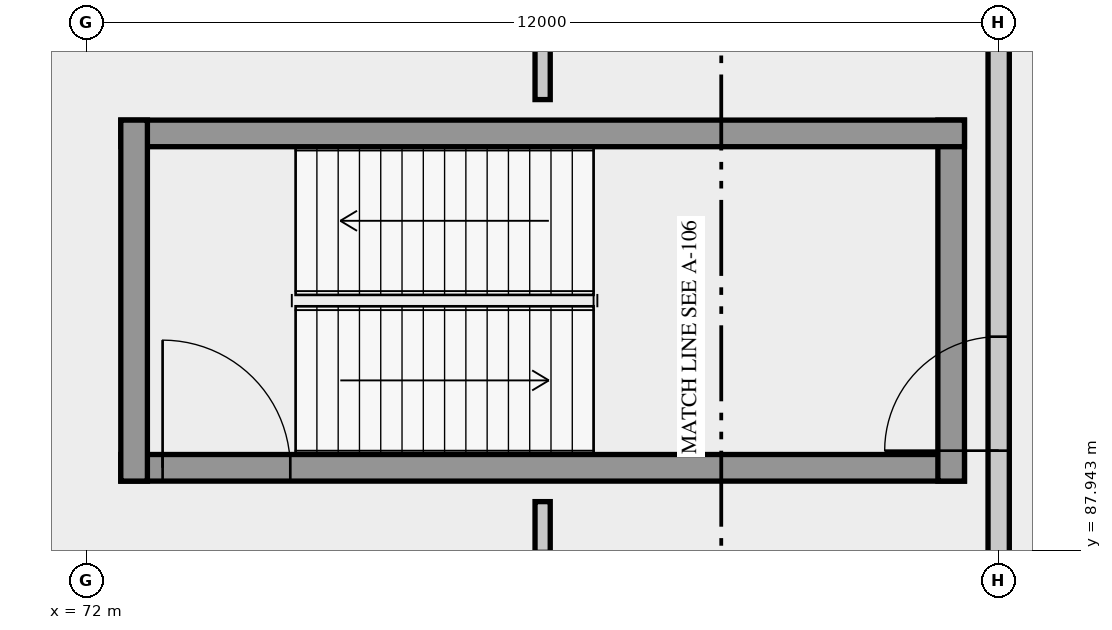
"""IFC4 building model, lengths in metres.
Left out: names, types, materials, properties, quantities, classifications, styles, units other than length and angle.
Written with IfcOpenShell. Run it as: python <this file> out.ifc"""

import sys

from ifc_helpers import new_model, si_unit, direction, frame, frame_2d, origin, place, context, subcontext, project, spatial, rectangle, extrude, element, fill, save


model = new_model("IFC4")
c1 = context("Model", 3, precision=1e-05, world=origin(), true_north=direction((0.0, 1.0)))
c2 = subcontext(c1, "Body", "Model", "MODEL_VIEW")
j1 = project(units=[si_unit("LENGTHUNIT", "METRE"), si_unit("PLANEANGLEUNIT", "RADIAN")], contexts=[c1])
p1 = place(None, origin())
s1 = spatial("IfcSite", under=j1, at=p1, CompositionType="ELEMENT")
p2 = place(p1, origin())
s2 = spatial("IfcBuilding", under=s1, at=p2, CompositionType="ELEMENT")
p3 = place(p2, frame((0.0, 0.0, -5.4)))
s3 = spatial("IfcBuildingStorey", under=s2, at=p3, CompositionType="ELEMENT", Elevation=-5.4)
p4 = place(p3, frame((72.45, 89.025, 0.0), z_axis=(0.0, 0.0, 1.0), x_axis=(1.0, 0.0, 0.0)))
e1 = element("IfcWall", 1, at=p4, inside=s3, PredefinedType="SHEAR", context=c2, shape_type="SweptSolid", body=[
    extrude(rectangle(XDim=11.1, YDim=0.35, at=frame_2d((5.55, 0.0))), origin(), (0.0, 0.0, 1.0), 5.12),
])
p5 = place(p4, frame((0.55, 0.0, 0.0)))
e2 = element("IfcOpeningElement", 2, at=p5, cuts=e1, PredefinedType="OPENING", context=c2, shape_type="SweptSolid", body=[
    extrude(rectangle(XDim=1.68, YDim=2.35, at=frame_2d((0.84, 1.175))), frame((0.0, 0.185, 0.0), z_axis=(0.0, -1.0, 0.0), x_axis=(1.0, 0.0, 0.0)), (0.0, 0.0, 1.0), 0.37),
])
p6 = place(p3, frame((83.375, 88.85, 0.0), z_axis=(0.0, 0.0, 1.0), x_axis=(0.0, 1.0, 0.0)))
e3 = element("IfcWall", 3, at=p6, inside=s3, PredefinedType="SHEAR", context=c2, shape_type="SweptSolid", body=[
    extrude(rectangle(XDim=4.75, YDim=0.35, at=frame_2d((2.375, 0.0))), origin(), (0.0, 0.0, 1.0), 5.12),
])
p7 = place(p3, frame((83.55, 93.425, 0.0), z_axis=(0.0, 0.0, 1.0), x_axis=(-1.0, 0.0, 0.0)))
e4 = element("IfcWall", 4, at=p7, inside=s3, PredefinedType="SHEAR", context=c2, shape_type="SweptSolid", body=[
    extrude(rectangle(XDim=11.1, YDim=0.35, at=frame_2d((5.55, 0.0))), origin(), (0.0, 0.0, 1.0), 5.12),
])
p8 = place(p3, frame((72.625, 93.6, 0.0), z_axis=(0.0, 0.0, 1.0), x_axis=(0.0, -1.0, 0.0)))
e5 = element("IfcWall", 5, at=p8, inside=s3, PredefinedType="SHEAR", context=c2, shape_type="SweptSolid", body=[
    extrude(rectangle(XDim=4.75, YDim=0.35, at=frame_2d((2.375, 0.0))), origin(), (0.0, 0.0, 1.0), 5.12),
])
p9 = place(p3, frame((78.0, 84.37, 0.0), z_axis=(0.0, 0.0, 1.0), x_axis=(0.0, 1.0, 0.0)))
e6 = element("IfcWall", 6, at=p9, inside=s3, PredefinedType="PARTITIONING", context=c2, shape_type="SweptSolid", body=[
    extrude(rectangle(XDim=4.21, YDim=0.2, at=frame_2d((2.105, 0.0))), origin(), (0.0, 0.0, 1.0), 5.1),
])
p10 = place(p9, frame((2.51, 0.0, 0.0)))
e7 = element("IfcOpeningElement", 7, at=p10, cuts=e6, PredefinedType="OPENING", context=c2, shape_type="SweptSolid", body=[
    extrude(rectangle(XDim=1.05, YDim=2.2, at=frame_2d((0.525, 1.1))), frame((0.0, 0.11, 0.0), z_axis=(0.0, -1.0, 0.0), x_axis=(1.0, 0.0, 0.0)), (0.0, 0.0, 1.0), 0.22),
])
p11 = place(p3, frame((78.0, 93.87, 0.0), z_axis=(0.0, 0.0, 1.0), x_axis=(0.0, 1.0, 0.0)))
e8 = element("IfcWall", 8, at=p11, inside=s3, PredefinedType="PARTITIONING", context=c2, shape_type="SweptSolid", body=[
    extrude(rectangle(XDim=1.76, YDim=0.2, at=frame_2d((0.88, 0.0))), origin(), (0.0, 0.0, 1.0), 5.1),
])
p12 = place(p3, frame((84.0, 84.594, 0.0), z_axis=(0.0, 0.0, 1.0), x_axis=(0.0, 1.0, 0.0)))
e9 = element("IfcWall", 9, at=p12, inside=s3, PredefinedType="SOLIDWALL", context=c2, shape_type="SweptSolid", body=[
    extrude(rectangle(XDim=10.811, YDim=0.28, at=frame_2d((5.406, 0.0))), origin(), (0.0, 0.0, 1.0), 4.53),
])
p13 = place(p12, frame((4.656, 0.0, 0.0)))
e10 = element("IfcOpeningElement", 10, at=p13, cuts=e9, PredefinedType="OPENING", context=c2, shape_type="SweptSolid", body=[
    extrude(rectangle(XDim=1.5, YDim=2.35, at=frame_2d((0.75, 1.175))), frame((0.0, 0.15, 0.0), z_axis=(0.0, -1.0, 0.0), x_axis=(1.0, 0.0, 0.0)), (0.0, 0.0, 1.0), 0.3),
])
p14 = place(p5, origin())
e11 = element("IfcDoor", 11, at=p14, inside=s3, OperationType="DOUBLE_DOOR_SINGLE_SWING", PredefinedType="DOOR", context=c2, shape_type="SweptSolid", body=[
    extrude(rectangle(XDim=1.68, YDim=2.35, at=frame_2d((0.84, 1.175))), frame((0.0, 0.025, 0.0), z_axis=(0.0, -1.0, 0.0), x_axis=(1.0, 0.0, 0.0)), (0.0, 0.0, 1.0), 0.05),
])
fill(e2, e11)
p15 = place(p13, origin())
e12 = element("IfcDoor", 12, at=p15, inside=s3, OperationType="DOUBLE_DOOR_SINGLE_SWING", PredefinedType="DOOR", context=c2, shape_type="SweptSolid", body=[
    extrude(rectangle(XDim=1.5, YDim=2.35, at=frame_2d((0.75, 1.175))), frame((0.0, 0.025, 0.0), z_axis=(0.0, -1.0, 0.0), x_axis=(1.0, 0.0, 0.0)), (0.0, 0.0, 1.0), 0.05),
])
fill(e10, e12)
save(model, sys.argv[1])
